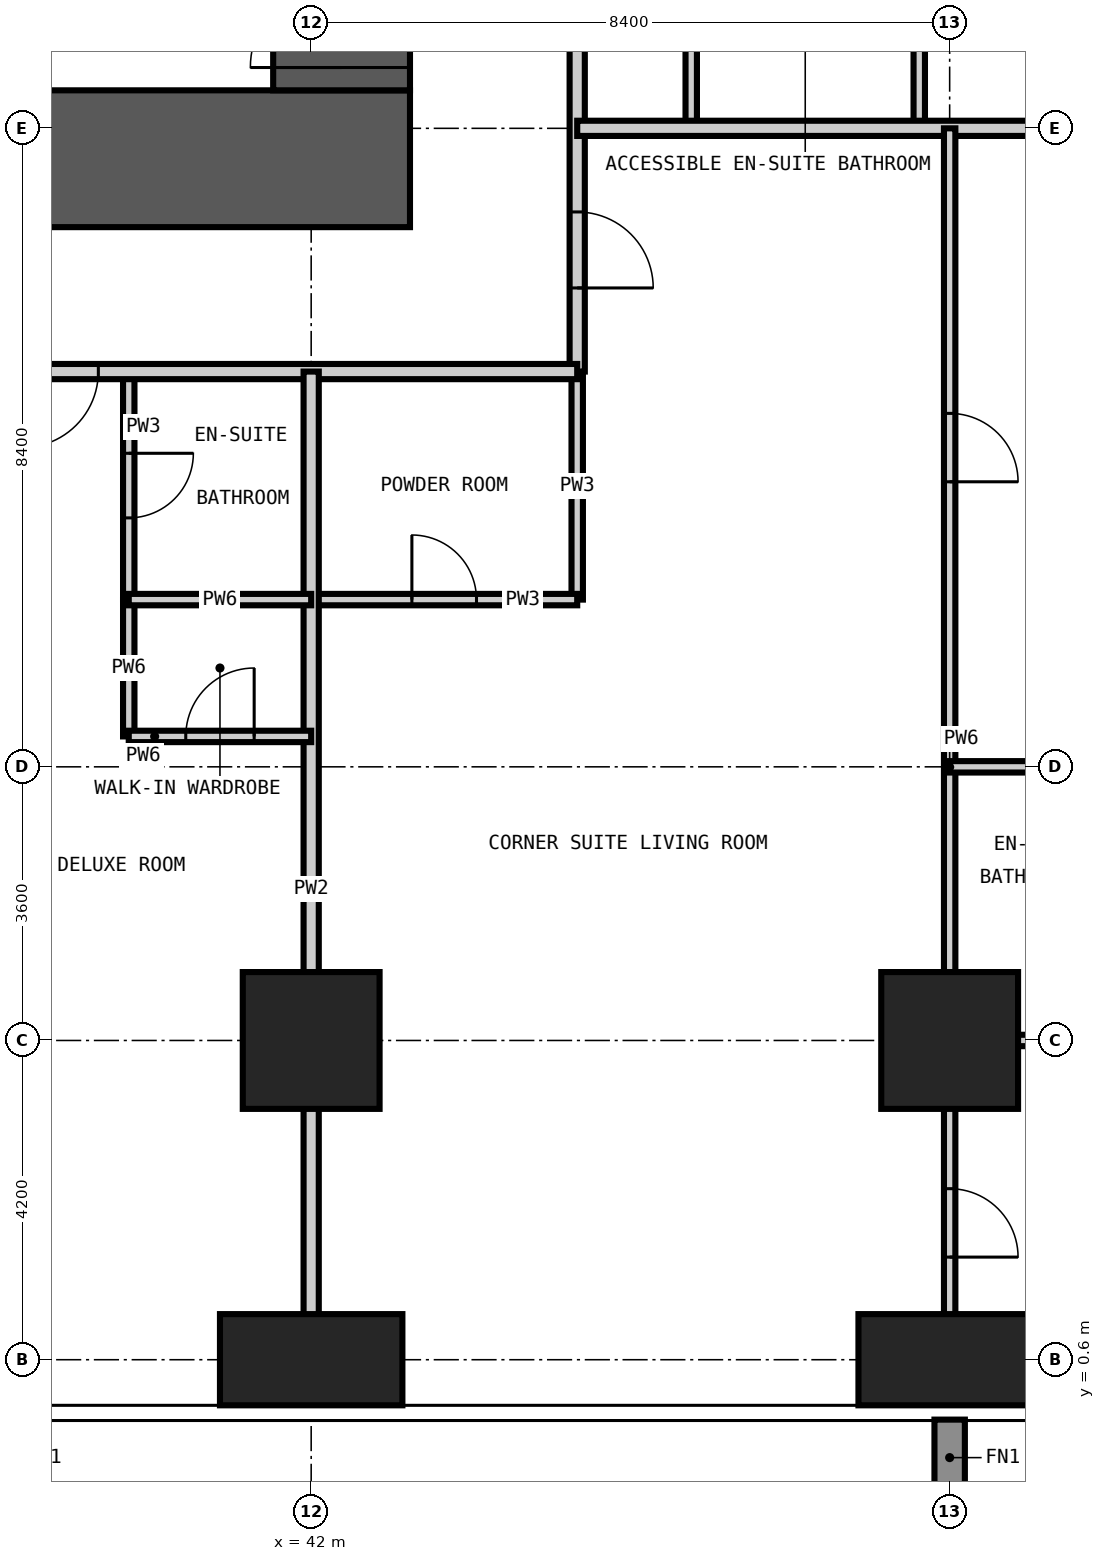
"""IFC4 building model, lengths in metres.
Left out: names, types, materials, properties, quantities, classifications, styles, units other than length and angle.
Written with IfcOpenShell. Run it as: python <this file> out.ifc"""

import sys

from ifc_helpers import new_model, si_unit, direction, frame, frame_2d, origin, origin_2d, place, context, subcontext, project, spatial, rectangle, extrude, element, fill, save


model = new_model("IFC4")
c1 = context("Model", 3, precision=1e-05, world=origin(), true_north=direction((0.0, 1.0)))
c2 = subcontext(c1, "Body", "Model", "MODEL_VIEW")
j1 = project(units=[si_unit("LENGTHUNIT", "METRE"), si_unit("PLANEANGLEUNIT", "RADIAN")], contexts=[c1])
p1 = place(None, origin())
s1 = spatial("IfcSite", under=j1, at=p1, CompositionType="ELEMENT")
p2 = place(p1, origin())
s2 = spatial("IfcBuilding", under=s1, at=p2, CompositionType="ELEMENT")
p3 = place(p2, frame((0.0, 0.0, 30.6)))
s3 = spatial("IfcBuildingStorey", under=s2, at=p3, CompositionType="ELEMENT", Elevation=30.6)
p4 = place(p3, frame((42.0, 0.6, -0.35), z_axis=(0.0, 0.0, 1.0), x_axis=(1.0, 0.0, 0.0)))
e1 = element("IfcColumn", 1, at=p4, inside=s3, PredefinedType="COLUMN", context=c2, shape_type="SweptSolid", body=[
    extrude(rectangle(XDim=2.4, YDim=1.2, at=origin_2d()), origin(), (0.0, 0.0, 1.0), 3.6),
])
p5 = place(p3, frame((42.0, 4.8, -0.35), z_axis=(0.0, 0.0, 1.0), x_axis=(1.0, 0.0, 0.0)))
e2 = element("IfcColumn", 2, at=p5, inside=s3, PredefinedType="COLUMN", context=c2, shape_type="SweptSolid", body=[
    extrude(rectangle(XDim=1.8, YDim=1.8, at=origin_2d()), origin(), (0.0, 0.0, 1.0), 3.6),
])
p6 = place(p3, frame((50.4, 0.6, -0.35), z_axis=(0.0, 0.0, 1.0), x_axis=(1.0, 0.0, 0.0)))
e3 = element("IfcColumn", 3, at=p6, inside=s3, PredefinedType="COLUMN", context=c2, shape_type="SweptSolid", body=[
    extrude(rectangle(XDim=2.4, YDim=1.2, at=origin_2d()), origin(), (0.0, 0.0, 1.0), 3.6),
])
p7 = place(p3, frame((50.4, 4.8, -0.35), z_axis=(0.0, 0.0, 1.0), x_axis=(1.0, 0.0, 0.0)))
e4 = element("IfcColumn", 4, at=p7, inside=s3, PredefinedType="COLUMN", context=c2, shape_type="SweptSolid", body=[
    extrude(rectangle(XDim=1.8, YDim=1.8, at=origin_2d()), origin(), (0.0, 0.0, 1.0), 3.6),
])
p8 = place(p3, frame((15.5, 16.4, -0.35), z_axis=(0.0, 0.0, 1.0), x_axis=(1.0, 0.0, 0.0)))
e5 = element("IfcWall", 5, at=p8, inside=s3, PredefinedType="SHEAR", context=c2, shape_type="SweptSolid", body=[
    extrude(rectangle(XDim=27.8, YDim=1.8, at=frame_2d((13.9, 0.0))), origin(), (0.0, 0.0, 1.0), 3.6),
])
p9 = place(p8, frame((13.4, 0.0, 0.35)))
e6 = element("IfcOpeningElement", 6, at=p9, cuts=e5, PredefinedType="OPENING", context=c2, shape_type="SweptSolid", body=[
    extrude(rectangle(XDim=1.0, YDim=2.1, at=frame_2d((0.5, 1.05))), frame((0.0, 0.91, 0.0), z_axis=(0.0, -1.0, 0.0), x_axis=(1.0, 0.0, 0.0)), (0.0, 0.0, 1.0), 1.82),
])
p10 = place(p8, frame((19.7, 0.0, 0.35)))
e7 = element("IfcOpeningElement", 7, at=p10, cuts=e5, PredefinedType="OPENING", context=c2, shape_type="SweptSolid", body=[
    extrude(rectangle(XDim=1.0, YDim=2.1, at=frame_2d((0.5, 1.05))), frame((0.0, 0.91, 0.0), z_axis=(0.0, -1.0, 0.0), x_axis=(1.0, 0.0, 0.0)), (0.0, 0.0, 1.0), 1.82),
])
p11 = place(p3, frame((42.4, 17.3, -0.35), z_axis=(0.0, 0.0, 1.0), x_axis=(0.0, 1.0, 0.0)))
e8 = element("IfcWall", 8, at=p11, inside=s3, PredefinedType="SHEAR", context=c2, shape_type="SweptSolid", body=[
    extrude(rectangle(XDim=24.2, YDim=1.8, at=frame_2d((12.1, 0.0))), origin(), (0.0, 0.0, 1.0), 3.6),
])
p12 = place(p11, frame((0.3, 0.0, 0.35)))
e9 = element("IfcOpeningElement", 9, at=p12, cuts=e8, PredefinedType="OPENING", context=c2, shape_type="SweptSolid", body=[
    extrude(rectangle(XDim=1.2, YDim=2.2, at=frame_2d((0.6, 1.1))), frame((0.0, 0.91, 0.0), z_axis=(0.0, -1.0, 0.0), x_axis=(1.0, 0.0, 0.0)), (0.0, 0.0, 1.0), 1.82),
])
p13 = place(p11, frame((11.6, 0.0, 0.35)))
e10 = element("IfcOpeningElement", 10, at=p13, cuts=e8, PredefinedType="OPENING", context=c2, shape_type="SweptSolid", body=[
    extrude(rectangle(XDim=1.0, YDim=2.1, at=frame_2d((0.5, 1.05))), frame((0.0, 0.91, 0.0), z_axis=(0.0, -1.0, 0.0), x_axis=(1.0, 0.0, 0.0)), (0.0, 0.0, 1.0), 1.82),
])
p14 = place(p11, frame((20.0, 0.0, 0.35)))
e11 = element("IfcOpeningElement", 11, at=p14, cuts=e8, PredefinedType="OPENING", context=c2, shape_type="SweptSolid", body=[
    extrude(rectangle(XDim=1.0, YDim=2.1, at=frame_2d((0.5, 1.05))), frame((0.0, 0.91, 0.0), z_axis=(0.0, -1.0, 0.0), x_axis=(1.0, 0.0, 0.0)), (0.0, 0.0, 1.0), 1.82),
])
p15 = place(p3, frame((39.6, 10.6, 0.0), z_axis=(0.0, 0.0, 1.0), x_axis=(0.0, 1.0, 0.0)))
e12 = element("IfcWall", 12, at=p15, inside=s3, PredefinedType="PARTITIONING", context=c2, shape_type="SweptSolid", body=[
    extrude(rectangle(XDim=3.0, YDim=0.15, at=frame_2d((1.5, 0.0))), origin(), (0.0, 0.0, 1.0), 3.25),
])
p16 = place(p15, frame((1.075, 0.0, 0.0)))
e13 = element("IfcOpeningElement", 13, at=p16, cuts=e12, PredefinedType="OPENING", context=c2, shape_type="SweptSolid", body=[
    extrude(rectangle(XDim=0.85, YDim=2.1, at=frame_2d((0.425, 1.05))), frame((0.0, 0.085, 0.0), z_axis=(0.0, -1.0, 0.0), x_axis=(1.0, 0.0, 0.0)), (0.0, 0.0, 1.0), 0.17),
])
p17 = place(p3, frame((45.5, 10.6, 0.0), z_axis=(0.0, 0.0, 1.0), x_axis=(0.0, 1.0, 0.0)))
e14 = element("IfcWall", 14, at=p17, inside=s3, PredefinedType="PARTITIONING", context=c2, shape_type="SweptSolid", body=[
    extrude(rectangle(XDim=3.0, YDim=0.15, at=frame_2d((1.5, 0.0))), origin(), (0.0, 0.0, 1.0), 3.25),
])
for number, where, z_axis, x_axis in (
    (15, (47.0, 16.8, 0.0), (0.0, 0.0, 1.0), (0.0, 1.0, 0.0)),
    (16, (50.0, 16.8, 0.0), (0.0, 0.0, 1.0), (0.0, 1.0, 0.0)),
):
    element("IfcWall", number, at=place(p3, frame(where, z_axis=z_axis, x_axis=x_axis)), inside=s3, PredefinedType="PARTITIONING", context=c2, shape_type="SweptSolid", body=[
        extrude(rectangle(XDim=2.7, YDim=0.15, at=frame_2d((1.35, 0.0))), origin(), (0.0, 0.0, 1.0), 3.25),
    ])
p18 = place(p3, frame((50.4, 4.8, 0.0), z_axis=(0.0, 0.0, 1.0), x_axis=(1.0, 0.0, 0.0)))
e17 = element("IfcWall", 17, at=p18, inside=s3, PredefinedType="PARTITIONING", context=c2, shape_type="SweptSolid", body=[
    extrude(rectangle(XDim=3.0, YDim=0.15, at=frame_2d((1.5, 0.0))), origin(), (0.0, 0.0, 1.0), 3.25),
])
p19 = place(p3, frame((42.0, 10.6, 0.0), z_axis=(0.0, 0.0, 1.0), x_axis=(1.0, 0.0, 0.0)))
e18 = element("IfcWall", 18, at=p19, inside=s3, PredefinedType="PARTITIONING", context=c2, shape_type="SweptSolid", body=[
    extrude(rectangle(XDim=3.5, YDim=0.15, at=frame_2d((1.75, 0.0))), origin(), (0.0, 0.0, 1.0), 3.25),
])
p20 = place(p19, frame((1.325, 0.0, 0.0)))
e19 = element("IfcOpeningElement", 19, at=p20, cuts=e18, PredefinedType="OPENING", context=c2, shape_type="SweptSolid", body=[
    extrude(rectangle(XDim=0.85, YDim=2.1, at=frame_2d((0.425, 1.05))), frame((0.0, 0.085, 0.0), z_axis=(0.0, -1.0, 0.0), x_axis=(1.0, 0.0, 0.0)), (0.0, 0.0, 1.0), 0.17),
])
p21 = place(p3, frame((45.5, 45.8, 0.0), z_axis=(0.0, 0.0, 1.0), x_axis=(0.0, -1.0, 0.0)))
e20 = element("IfcWall", 20, at=p21, inside=s3, PredefinedType="PARTITIONING", context=c2, shape_type="SweptSolid", body=[
    extrude(rectangle(XDim=32.2, YDim=0.2, at=frame_2d((16.1, 0.0))), origin(), (0.0, 0.0, 1.0), 3.25),
])
p22 = place(p21, frame((26.4, 0.0, 0.0)))
e21 = element("IfcOpeningElement", 21, at=p22, cuts=e20, PredefinedType="OPENING", context=c2, shape_type="SweptSolid", body=[
    extrude(rectangle(XDim=1.0, YDim=2.2, at=frame_2d((0.5, 1.1))), frame((0.0, 0.11, 0.0), z_axis=(0.0, -1.0, 0.0), x_axis=(1.0, 0.0, 0.0)), (0.0, 0.0, 1.0), 0.22),
])
p23 = place(p21, frame((22.2, 0.0, 0.0)))
e22 = element("IfcOpeningElement", 22, at=p23, cuts=e20, PredefinedType="OPENING", context=c2, shape_type="SweptSolid", body=[
    extrude(rectangle(XDim=1.0, YDim=2.2, at=frame_2d((0.5, 1.1))), frame((0.0, 0.11, 0.0), z_axis=(0.0, -1.0, 0.0), x_axis=(1.0, 0.0, 0.0)), (0.0, 0.0, 1.0), 0.22),
])
p24 = place(p21, frame((16.8, 0.0, 0.0)))
e23 = element("IfcOpeningElement", 23, at=p24, cuts=e20, PredefinedType="OPENING", context=c2, shape_type="SweptSolid", body=[
    extrude(rectangle(XDim=1.0, YDim=2.2, at=frame_2d((0.5, 1.1))), frame((0.0, 0.11, 0.0), z_axis=(0.0, -1.0, 0.0), x_axis=(1.0, 0.0, 0.0)), (0.0, 0.0, 1.0), 0.22),
])
p25 = place(p21, frame((15.0, 0.0, 0.0)))
e24 = element("IfcOpeningElement", 24, at=p25, cuts=e20, PredefinedType="OPENING", context=c2, shape_type="SweptSolid", body=[
    extrude(rectangle(XDim=1.0, YDim=2.2, at=frame_2d((0.5, 1.1))), frame((0.0, 0.11, 0.0), z_axis=(0.0, -1.0, 0.0), x_axis=(1.0, 0.0, 0.0)), (0.0, 0.0, 1.0), 0.22),
])
p26 = place(p21, frame((8.4, 0.0, 0.0)))
e25 = element("IfcOpeningElement", 25, at=p26, cuts=e20, PredefinedType="OPENING", context=c2, shape_type="SweptSolid", body=[
    extrude(rectangle(XDim=1.0, YDim=2.2, at=frame_2d((0.5, 1.1))), frame((0.0, 0.11, 0.0), z_axis=(0.0, -1.0, 0.0), x_axis=(1.0, 0.0, 0.0)), (0.0, 0.0, 1.0), 0.22),
])
p27 = place(p21, frame((6.6, 0.0, 0.0)))
e26 = element("IfcOpeningElement", 26, at=p27, cuts=e20, PredefinedType="OPENING", context=c2, shape_type="SweptSolid", body=[
    extrude(rectangle(XDim=1.0, YDim=2.2, at=frame_2d((0.5, 1.1))), frame((0.0, 0.11, 0.0), z_axis=(0.0, -1.0, 0.0), x_axis=(1.0, 0.0, 0.0)), (0.0, 0.0, 1.0), 0.22),
])
p28 = place(p21, frame((30.1, 0.0, 0.0)))
e27 = element("IfcOpeningElement", 27, at=p28, cuts=e20, PredefinedType="OPENING", context=c2, shape_type="SweptSolid", body=[
    extrude(rectangle(XDim=1.0, YDim=2.2, at=frame_2d((0.5, 1.1))), frame((0.0, 0.11, 0.0), z_axis=(0.0, -1.0, 0.0), x_axis=(1.0, 0.0, 0.0)), (0.0, 0.0, 1.0), 0.22),
])
p29 = place(p21, frame((1.4, 0.0, 0.0)))
e28 = element("IfcOpeningElement", 28, at=p29, cuts=e20, PredefinedType="OPENING", context=c2, shape_type="SweptSolid", body=[
    extrude(rectangle(XDim=1.0, YDim=2.2, at=frame_2d((0.5, 1.1))), frame((0.0, 0.11, 0.0), z_axis=(0.0, -1.0, 0.0), x_axis=(1.0, 0.0, 0.0)), (0.0, 0.0, 1.0), 0.22),
])
p30 = place(p3, frame((45.5, 13.6, 0.0), z_axis=(0.0, 0.0, 1.0), x_axis=(-1.0, 0.0, 0.0)))
e29 = element("IfcWall", 29, at=p30, inside=s3, PredefinedType="PARTITIONING", context=c2, shape_type="SweptSolid", body=[
    extrude(rectangle(XDim=31.9, YDim=0.2, at=frame_2d((15.95, 0.0))), origin(), (0.0, 0.0, 1.0), 3.25),
])
p31 = place(p30, frame((24.9, 0.0, 0.0)))
e30 = element("IfcOpeningElement", 30, at=p31, cuts=e29, PredefinedType="OPENING", context=c2, shape_type="SweptSolid", body=[
    extrude(rectangle(XDim=1.0, YDim=2.2, at=frame_2d((0.5, 1.1))), frame((0.0, 0.11, 0.0), z_axis=(0.0, -1.0, 0.0), x_axis=(1.0, 0.0, 0.0)), (0.0, 0.0, 1.0), 0.22),
])
p32 = place(p30, frame((23.1, 0.0, 0.0)))
e31 = element("IfcOpeningElement", 31, at=p32, cuts=e29, PredefinedType="OPENING", context=c2, shape_type="SweptSolid", body=[
    extrude(rectangle(XDim=1.0, YDim=2.2, at=frame_2d((0.5, 1.1))), frame((0.0, 0.11, 0.0), z_axis=(0.0, -1.0, 0.0), x_axis=(1.0, 0.0, 0.0)), (0.0, 0.0, 1.0), 0.22),
])
p33 = place(p30, frame((16.5, 0.0, 0.0)))
e32 = element("IfcOpeningElement", 32, at=p33, cuts=e29, PredefinedType="OPENING", context=c2, shape_type="SweptSolid", body=[
    extrude(rectangle(XDim=1.0, YDim=2.2, at=frame_2d((0.5, 1.1))), frame((0.0, 0.11, 0.0), z_axis=(0.0, -1.0, 0.0), x_axis=(1.0, 0.0, 0.0)), (0.0, 0.0, 1.0), 0.22),
])
p34 = place(p30, frame((14.7, 0.0, 0.0)))
e33 = element("IfcOpeningElement", 33, at=p34, cuts=e29, PredefinedType="OPENING", context=c2, shape_type="SweptSolid", body=[
    extrude(rectangle(XDim=1.0, YDim=2.2, at=frame_2d((0.5, 1.1))), frame((0.0, 0.11, 0.0), z_axis=(0.0, -1.0, 0.0), x_axis=(1.0, 0.0, 0.0)), (0.0, 0.0, 1.0), 0.22),
])
p35 = place(p30, frame((8.1, 0.0, 0.0)))
e34 = element("IfcOpeningElement", 34, at=p35, cuts=e29, PredefinedType="OPENING", context=c2, shape_type="SweptSolid", body=[
    extrude(rectangle(XDim=1.0, YDim=2.2, at=frame_2d((0.5, 1.1))), frame((0.0, 0.11, 0.0), z_axis=(0.0, -1.0, 0.0), x_axis=(1.0, 0.0, 0.0)), (0.0, 0.0, 1.0), 0.22),
])
p36 = place(p30, frame((6.3, 0.0, 0.0)))
e35 = element("IfcOpeningElement", 35, at=p36, cuts=e29, PredefinedType="OPENING", context=c2, shape_type="SweptSolid", body=[
    extrude(rectangle(XDim=1.0, YDim=2.2, at=frame_2d((0.5, 1.1))), frame((0.0, 0.11, 0.0), z_axis=(0.0, -1.0, 0.0), x_axis=(1.0, 0.0, 0.0)), (0.0, 0.0, 1.0), 0.22),
])
p37 = place(p3, frame((42.0, -0.008, 0.0), z_axis=(0.0, 0.0, 1.0), x_axis=(0.0, 1.0, 0.0)))
e36 = element("IfcWall", 36, at=p37, inside=s3, PredefinedType="PARTITIONING", context=c2, shape_type="SweptSolid", body=[
    extrude(rectangle(XDim=13.608, YDim=0.2, at=frame_2d((6.804, 0.0))), origin(), (0.0, 0.0, 1.0), 3.25),
])
p38 = place(p3, frame((45.5, 16.8, 0.0), z_axis=(0.0, 0.0, 1.0), x_axis=(1.0, 0.0, 0.0)))
e37 = element("IfcWall", 37, at=p38, inside=s3, PredefinedType="PARTITIONING", context=c2, shape_type="SweptSolid", body=[
    extrude(rectangle(XDim=13.308, YDim=0.2, at=frame_2d((6.654, 0.0))), origin(), (0.0, 0.0, 1.0), 3.25),
])
p39 = place(p3, frame((39.6, 8.8, 0.0), z_axis=(0.0, 0.0, 1.0), x_axis=(0.0, 1.0, 0.0)))
e38 = element("IfcWall", 38, at=p39, inside=s3, PredefinedType="PARTITIONING", context=c2, shape_type="SweptSolid", body=[
    extrude(rectangle(XDim=1.8, YDim=0.15, at=frame_2d((0.9, 0.0))), origin(), (0.0, 0.0, 1.0), 3.25),
])
p40 = place(p3, frame((50.4, -0.008, 0.0), z_axis=(0.0, 0.0, 1.0), x_axis=(0.0, 1.0, 0.0)))
e39 = element("IfcWall", 39, at=p40, inside=s3, PredefinedType="PARTITIONING", context=c2, shape_type="SweptSolid", body=[
    extrude(rectangle(XDim=16.808, YDim=0.15, at=frame_2d((8.404, 0.0))), origin(), (0.0, 0.0, 1.0), 3.25),
])
p41 = place(p40, frame((1.958, 0.0, 0.0)))
e40 = element("IfcOpeningElement", 40, at=p41, cuts=e39, PredefinedType="OPENING", context=c2, shape_type="SweptSolid", body=[
    extrude(rectangle(XDim=0.9, YDim=2.1, at=frame_2d((0.45, 1.05))), frame((0.0, 0.085, 0.0), z_axis=(0.0, -1.0, 0.0), x_axis=(1.0, 0.0, 0.0)), (0.0, 0.0, 1.0), 0.17),
])
p42 = place(p40, frame((12.158, 0.0, 0.0)))
e41 = element("IfcOpeningElement", 41, at=p42, cuts=e39, PredefinedType="OPENING", context=c2, shape_type="SweptSolid", body=[
    extrude(rectangle(XDim=0.9, YDim=2.1, at=frame_2d((0.45, 1.05))), frame((0.0, 0.085, 0.0), z_axis=(0.0, -1.0, 0.0), x_axis=(1.0, 0.0, 0.0)), (0.0, 0.0, 1.0), 0.17),
])
p43 = place(p3, frame((50.4, 8.4, 0.0), z_axis=(0.0, 0.0, 1.0), x_axis=(1.0, 0.0, 0.0)))
e42 = element("IfcWall", 42, at=p43, inside=s3, PredefinedType="PARTITIONING", context=c2, shape_type="SweptSolid", body=[
    extrude(rectangle(XDim=8.408, YDim=0.15, at=frame_2d((4.204, 0.0))), origin(), (0.0, 0.0, 1.0), 3.25),
])
p44 = place(p43, frame((4.55, 0.0, 0.0)))
e43 = element("IfcOpeningElement", 43, at=p44, cuts=e42, PredefinedType="OPENING", context=c2, shape_type="SweptSolid", body=[
    extrude(rectangle(XDim=0.9, YDim=2.1, at=frame_2d((0.45, 1.05))), frame((0.0, 0.085, 0.0), z_axis=(0.0, -1.0, 0.0), x_axis=(1.0, 0.0, 0.0)), (0.0, 0.0, 1.0), 0.17),
])
p45 = place(p3, frame((39.6, 8.8, 0.0), z_axis=(0.0, 0.0, 1.0), x_axis=(1.0, 0.0, 0.0)))
e44 = element("IfcWall", 44, at=p45, inside=s3, PredefinedType="PARTITIONING", context=c2, shape_type="SweptSolid", body=[
    extrude(rectangle(XDim=2.4, YDim=0.15, at=frame_2d((1.2, 0.0))), origin(), (0.0, 0.0, 1.0), 3.25),
])
p46 = place(p45, frame((0.75, 0.0, 0.0)))
e45 = element("IfcOpeningElement", 45, at=p46, cuts=e44, PredefinedType="OPENING", context=c2, shape_type="SweptSolid", body=[
    extrude(rectangle(XDim=0.9, YDim=2.1, at=frame_2d((0.45, 1.05))), frame((0.0, 0.085, 0.0), z_axis=(0.0, -1.0, 0.0), x_axis=(1.0, 0.0, 0.0)), (0.0, 0.0, 1.0), 0.17),
])
p47 = place(p3, frame((39.6, 10.6, 0.0), z_axis=(0.0, 0.0, 1.0), x_axis=(1.0, 0.0, 0.0)))
e46 = element("IfcWall", 46, at=p47, inside=s3, PredefinedType="PARTITIONING", context=c2, shape_type="SweptSolid", body=[
    extrude(rectangle(XDim=2.4, YDim=0.15, at=frame_2d((1.2, 0.0))), origin(), (0.0, 0.0, 1.0), 3.25),
])
p48 = place(p12, origin())
e47 = element("IfcDoor", 47, at=p48, inside=s3, OperationType="SINGLE_SWING_LEFT", PredefinedType="DOOR", context=c2, shape_type="SweptSolid", body=[
    extrude(rectangle(XDim=1.2, YDim=2.2, at=frame_2d((0.6, 1.1))), frame((0.0, 0.025, 0.0), z_axis=(0.0, -1.0, 0.0), x_axis=(1.0, 0.0, 0.0)), (0.0, 0.0, 1.0), 0.05),
])
fill(e9, e47)
p49 = place(p36, origin())
e48 = element("IfcDoor", 48, at=p49, inside=s3, OperationType="SINGLE_SWING_RIGHT", PredefinedType="DOOR", context=c2, shape_type="SweptSolid", body=[
    extrude(rectangle(XDim=1.0, YDim=2.2, at=frame_2d((0.5, 1.1))), frame((0.0, 0.025, 0.0), z_axis=(0.0, -1.0, 0.0), x_axis=(1.0, 0.0, 0.0)), (0.0, 0.0, 1.0), 0.05),
])
fill(e35, e48)
p50 = place(p16, frame((0.85, 0.0, 0.0), z_axis=(0.0, 0.0, 1.0), x_axis=(-1.0, 0.0, 0.0)))
e49 = element("IfcDoor", 49, at=p50, inside=s3, OperationType="SINGLE_SWING_LEFT", PredefinedType="DOOR", context=c2, shape_type="SweptSolid", body=[
    extrude(rectangle(XDim=0.85, YDim=2.1, at=frame_2d((0.425, 1.05))), frame((0.0, 0.025, 0.0), z_axis=(0.0, -1.0, 0.0), x_axis=(1.0, 0.0, 0.0)), (0.0, 0.0, 1.0), 0.05),
])
fill(e13, e49)
p51 = place(p46, origin())
e50 = element("IfcDoor", 50, at=p51, inside=s3, OperationType="SINGLE_SWING_RIGHT", PredefinedType="DOOR", context=c2, shape_type="SweptSolid", body=[
    extrude(rectangle(XDim=0.9, YDim=2.1, at=frame_2d((0.45, 1.05))), frame((0.0, 0.025, 0.0), z_axis=(0.0, -1.0, 0.0), x_axis=(1.0, 0.0, 0.0)), (0.0, 0.0, 1.0), 0.05),
])
fill(e45, e50)
p52 = place(p28, origin())
e51 = element("IfcDoor", 51, at=p52, inside=s3, OperationType="SINGLE_SWING_RIGHT", PredefinedType="DOOR", context=c2, shape_type="SweptSolid", body=[
    extrude(rectangle(XDim=1.0, YDim=2.2, at=frame_2d((0.5, 1.1))), frame((0.0, 0.025, 0.0), z_axis=(0.0, -1.0, 0.0), x_axis=(1.0, 0.0, 0.0)), (0.0, 0.0, 1.0), 0.05),
])
fill(e27, e51)
p53 = place(p20, origin())
e52 = element("IfcDoor", 52, at=p53, inside=s3, OperationType="SINGLE_SWING_LEFT", PredefinedType="DOOR", context=c2, shape_type="SweptSolid", body=[
    extrude(rectangle(XDim=0.85, YDim=2.1, at=frame_2d((0.425, 1.05))), frame((0.0, 0.025, 0.0), z_axis=(0.0, -1.0, 0.0), x_axis=(1.0, 0.0, 0.0)), (0.0, 0.0, 1.0), 0.05),
])
fill(e19, e52)
p54 = place(p41, frame((0.9, 0.0, 0.0), z_axis=(0.0, 0.0, 1.0), x_axis=(-1.0, 0.0, 0.0)))
e53 = element("IfcDoor", 53, at=p54, inside=s3, OperationType="SINGLE_SWING_RIGHT", PredefinedType="DOOR", context=c2, shape_type="SweptSolid", body=[
    extrude(rectangle(XDim=0.9, YDim=2.1, at=frame_2d((0.45, 1.05))), frame((0.0, 0.025, 0.0), z_axis=(0.0, -1.0, 0.0), x_axis=(1.0, 0.0, 0.0)), (0.0, 0.0, 1.0), 0.05),
])
fill(e40, e53)
p55 = place(p42, frame((0.9, 0.0, 0.0), z_axis=(0.0, 0.0, 1.0), x_axis=(-1.0, 0.0, 0.0)))
e54 = element("IfcDoor", 54, at=p55, inside=s3, OperationType="SINGLE_SWING_RIGHT", PredefinedType="DOOR", context=c2, shape_type="SweptSolid", body=[
    extrude(rectangle(XDim=0.9, YDim=2.1, at=frame_2d((0.45, 1.05))), frame((0.0, 0.025, 0.0), z_axis=(0.0, -1.0, 0.0), x_axis=(1.0, 0.0, 0.0)), (0.0, 0.0, 1.0), 0.05),
])
fill(e41, e54)
save(model, sys.argv[1])
